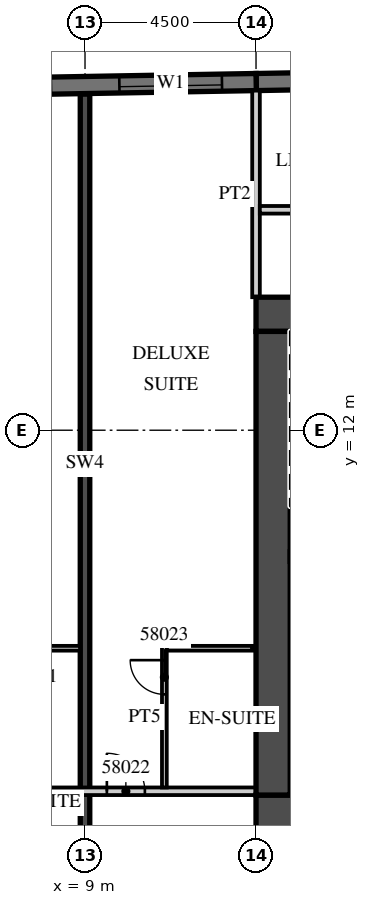
"""IFC4 building model, lengths in metres.
Left out: names, types, materials, properties, quantities, classifications, styles, units other than length and angle.
Written with IfcOpenShell. Run it as: python <this file> out.ifc"""

import sys

from ifc_helpers import new_model, si_unit, direction, frame, frame_2d, origin, place, context, subcontext, project, spatial, rectangle, extrude, element, fill, save


model = new_model("IFC4")
c1 = context("Model", 3, precision=1e-05, world=origin(), true_north=direction((0.0, 1.0)))
c2 = subcontext(c1, "Body", "Model", "MODEL_VIEW")
j1 = project(units=[si_unit("LENGTHUNIT", "METRE"), si_unit("PLANEANGLEUNIT", "RADIAN")], contexts=[c1])
p1 = place(None, origin())
s1 = spatial("IfcSite", under=j1, at=p1, CompositionType="ELEMENT")
p2 = place(p1, origin())
s2 = spatial("IfcBuilding", under=s1, at=p2, CompositionType="ELEMENT")
p3 = place(p2, frame((0.0, 0.0, 237.5)))
s3 = spatial("IfcBuildingStorey", under=s2, at=p3, CompositionType="ELEMENT", Elevation=237.5)
p4 = place(p3, frame((9.0, 1.4, 0.0), z_axis=(0.0, 0.0, 1.0), x_axis=(0.0, 1.0, 0.0)))
e1 = element("IfcWall", 1, at=p4, inside=s3, PredefinedType="SHEAR", context=c2, shape_type="SweptSolid", body=[
    extrude(rectangle(XDim=19.446, YDim=0.25, at=frame_2d((9.723, 0.0))), origin(), (0.0, 0.0, 1.0), 3.3),
])
p5 = place(p3, frame((31.504, 21.476, 0.0), z_axis=(0.0, 0.0, 1.0), x_axis=(-0.999847677887, -0.017453395744, 0.0)))
e2 = element("IfcWall", 2, at=p5, inside=s3, PredefinedType="SOLIDWALL", context=c2, shape_type="SweptSolid", body=[
    extrude(rectangle(XDim=18.003, YDim=0.45, at=frame_2d((9.001, 0.0))), origin(), (0.0, 0.0, 1.0), 3.02),
])
p6 = place(p3, frame((13.504, 21.161, 0.0), z_axis=(0.0, 0.0, 1.0), x_axis=(-0.999847763257, -0.017448504532, 0.0)))
e3 = element("IfcWall", 3, at=p6, inside=s3, PredefinedType="SOLIDWALL", context=c2, shape_type="SweptSolid", body=[
    extrude(rectangle(XDim=46.859, YDim=0.45, at=frame_2d((23.43, 0.0))), origin(), (0.0, 0.0, 1.0), 3.02),
])
p7 = place(p6, frame((0.9, 0.0, 0.45)))
e4 = element("IfcOpeningElement", 4, at=p7, cuts=e3, PredefinedType="OPENING", context=c2, shape_type="SweptSolid", body=[
    extrude(rectangle(XDim=2.7, YDim=2.25, at=frame_2d((1.35, 1.125))), frame((0.0, 0.235, 0.0), z_axis=(0.0, -1.0, 0.0), x_axis=(1.0, 0.0, 0.0)), (0.0, 0.0, 1.0), 0.47),
])
p8 = place(p6, frame((5.401, 0.0, 0.45)))
e5 = element("IfcOpeningElement", 5, at=p8, cuts=e3, PredefinedType="OPENING", context=c2, shape_type="SweptSolid", body=[
    extrude(rectangle(XDim=2.7, YDim=2.25, at=frame_2d((1.35, 1.125))), frame((0.0, 0.235, 0.0), z_axis=(0.0, -1.0, 0.0), x_axis=(1.0, 0.0, 0.0)), (0.0, 0.0, 1.0), 0.47),
])
p9 = place(p6, frame((9.902, 0.0, 0.45)))
e6 = element("IfcOpeningElement", 6, at=p9, cuts=e3, PredefinedType="OPENING", context=c2, shape_type="SweptSolid", body=[
    extrude(rectangle(XDim=2.7, YDim=2.25, at=frame_2d((1.35, 1.125))), frame((0.0, 0.235, 0.0), z_axis=(0.0, -1.0, 0.0), x_axis=(1.0, 0.0, 0.0)), (0.0, 0.0, 1.0), 0.47),
])
p10 = place(p6, frame((14.402, 0.0, 0.45)))
e7 = element("IfcOpeningElement", 7, at=p10, cuts=e3, PredefinedType="OPENING", context=c2, shape_type="SweptSolid", body=[
    extrude(rectangle(XDim=2.7, YDim=2.25, at=frame_2d((1.35, 1.125))), frame((0.0, 0.235, 0.0), z_axis=(0.0, -1.0, 0.0), x_axis=(1.0, 0.0, 0.0)), (0.0, 0.0, 1.0), 0.47),
])
p11 = place(p6, frame((18.903, 0.0, 0.45)))
e8 = element("IfcOpeningElement", 8, at=p11, cuts=e3, PredefinedType="OPENING", context=c2, shape_type="SweptSolid", body=[
    extrude(rectangle(XDim=2.7, YDim=2.25, at=frame_2d((1.35, 1.125))), frame((0.0, 0.235, 0.0), z_axis=(0.0, -1.0, 0.0), x_axis=(1.0, 0.0, 0.0)), (0.0, 0.0, 1.0), 0.47),
])
p12 = place(p6, frame((23.404, 0.0, 0.45)))
e9 = element("IfcOpeningElement", 9, at=p12, cuts=e3, PredefinedType="OPENING", context=c2, shape_type="SweptSolid", body=[
    extrude(rectangle(XDim=2.7, YDim=2.25, at=frame_2d((1.35, 1.125))), frame((0.0, 0.235, 0.0), z_axis=(0.0, -1.0, 0.0), x_axis=(1.0, 0.0, 0.0)), (0.0, 0.0, 1.0), 0.47),
])
p13 = place(p6, frame((27.904, 0.0, 0.45)))
e10 = element("IfcOpeningElement", 10, at=p13, cuts=e3, PredefinedType="OPENING", context=c2, shape_type="SweptSolid", body=[
    extrude(rectangle(XDim=2.7, YDim=2.25, at=frame_2d((1.35, 1.125))), frame((0.0, 0.235, 0.0), z_axis=(0.0, -1.0, 0.0), x_axis=(1.0, 0.0, 0.0)), (0.0, 0.0, 1.0), 0.47),
])
p14 = place(p6, frame((32.405, 0.0, 0.45)))
e11 = element("IfcOpeningElement", 11, at=p14, cuts=e3, PredefinedType="OPENING", context=c2, shape_type="SweptSolid", body=[
    extrude(rectangle(XDim=2.7, YDim=2.25, at=frame_2d((1.35, 1.125))), frame((0.0, 0.235, 0.0), z_axis=(0.0, -1.0, 0.0), x_axis=(1.0, 0.0, 0.0)), (0.0, 0.0, 1.0), 0.47),
])
p15 = place(p6, frame((36.906, 0.0, 0.45)))
e12 = element("IfcOpeningElement", 12, at=p15, cuts=e3, PredefinedType="OPENING", context=c2, shape_type="SweptSolid", body=[
    extrude(rectangle(XDim=2.7, YDim=2.25, at=frame_2d((1.35, 1.125))), frame((0.0, 0.235, 0.0), z_axis=(0.0, -1.0, 0.0), x_axis=(1.0, 0.0, 0.0)), (0.0, 0.0, 1.0), 0.47),
])
p16 = place(p6, frame((41.406, 0.0, 0.45)))
e13 = element("IfcOpeningElement", 13, at=p16, cuts=e3, PredefinedType="OPENING", context=c2, shape_type="SweptSolid", body=[
    extrude(rectangle(XDim=2.7, YDim=2.25, at=frame_2d((1.35, 1.125))), frame((0.0, 0.235, 0.0), z_axis=(0.0, -1.0, 0.0), x_axis=(1.0, 0.0, 0.0)), (0.0, 0.0, 1.0), 0.47),
])
p17 = place(p3, frame((13.5, 15.5, 0.0), z_axis=(0.0, 0.0, 1.0), x_axis=(0.0, 1.0, 0.0)))
e14 = element("IfcWall", 14, at=p17, inside=s3, PredefinedType="PARTITIONING", context=c2, shape_type="SweptSolid", body=[
    extrude(rectangle(XDim=5.436, YDim=0.2, at=frame_2d((2.718, 0.0))), origin(), (0.0, 0.0, 1.0), 3.02),
])
p18 = place(p3, frame((-13.5, 2.5, 0.0), z_axis=(0.0, 0.0, 1.0), x_axis=(1.0, 0.0, 0.0)))
e15 = element("IfcWall", 15, at=p18, inside=s3, PredefinedType="PARTITIONING", context=c2, shape_type="SweptSolid", body=[
    extrude(rectangle(XDim=27.0, YDim=0.2, at=frame_2d((13.5, 0.0))), origin(), (0.0, 0.0, 1.0), 3.02),
])
p19 = place(p18, frame((2.925, 0.0, 0.0)))
e16 = element("IfcOpeningElement", 16, at=p19, cuts=e15, PredefinedType="OPENING", context=c2, shape_type="SweptSolid", body=[
    extrude(rectangle(XDim=1.0, YDim=2.1, at=frame_2d((0.5, 1.05))), frame((0.0, 0.11, 0.0), z_axis=(0.0, -1.0, 0.0), x_axis=(1.0, 0.0, 0.0)), (0.0, 0.0, 1.0), 0.22),
])
p20 = place(p18, frame((7.45, 0.0, 0.0)))
e17 = element("IfcOpeningElement", 17, at=p20, cuts=e15, PredefinedType="OPENING", context=c2, shape_type="SweptSolid", body=[
    extrude(rectangle(XDim=1.0, YDim=2.1, at=frame_2d((0.5, 1.05))), frame((0.0, 0.11, 0.0), z_axis=(0.0, -1.0, 0.0), x_axis=(1.0, 0.0, 0.0)), (0.0, 0.0, 1.0), 0.22),
])
p21 = place(p18, frame((11.925, 0.0, 0.0)))
e18 = element("IfcOpeningElement", 18, at=p21, cuts=e15, PredefinedType="OPENING", context=c2, shape_type="SweptSolid", body=[
    extrude(rectangle(XDim=1.0, YDim=2.1, at=frame_2d((0.5, 1.05))), frame((0.0, 0.11, 0.0), z_axis=(0.0, -1.0, 0.0), x_axis=(1.0, 0.0, 0.0)), (0.0, 0.0, 1.0), 0.22),
])
p22 = place(p18, frame((16.45, 0.0, 0.0)))
e19 = element("IfcOpeningElement", 19, at=p22, cuts=e15, PredefinedType="OPENING", context=c2, shape_type="SweptSolid", body=[
    extrude(rectangle(XDim=1.0, YDim=2.1, at=frame_2d((0.5, 1.05))), frame((0.0, 0.11, 0.0), z_axis=(0.0, -1.0, 0.0), x_axis=(1.0, 0.0, 0.0)), (0.0, 0.0, 1.0), 0.22),
])
p23 = place(p18, frame((18.55, 0.0, 0.0)))
e20 = element("IfcOpeningElement", 20, at=p23, cuts=e15, PredefinedType="OPENING", context=c2, shape_type="SweptSolid", body=[
    extrude(rectangle(XDim=1.0, YDim=2.1, at=frame_2d((0.5, 1.05))), frame((0.0, 0.11, 0.0), z_axis=(0.0, -1.0, 0.0), x_axis=(1.0, 0.0, 0.0)), (0.0, 0.0, 1.0), 0.22),
])
p24 = place(p18, frame((23.075, 0.0, 0.0)))
e21 = element("IfcOpeningElement", 21, at=p24, cuts=e15, PredefinedType="OPENING", context=c2, shape_type="SweptSolid", body=[
    extrude(rectangle(XDim=1.0, YDim=2.1, at=frame_2d((0.5, 1.05))), frame((0.0, 0.11, 0.0), z_axis=(0.0, -1.0, 0.0), x_axis=(1.0, 0.0, 0.0)), (0.0, 0.0, 1.0), 0.22),
])
p25 = place(p3, frame((6.625, 6.263, 0.0), z_axis=(0.0, 0.0, 1.0), x_axis=(1.0, 0.0, 0.0)))
e22 = element("IfcWall", 22, at=p25, inside=s3, PredefinedType="PARTITIONING", context=c2, shape_type="SweptSolid", body=[
    extrude(rectangle(XDim=2.25, YDim=0.125, at=frame_2d((1.125, 0.0))), origin(), (0.0, 0.0, 1.0), 3.02),
])
p26 = place(p3, frame((11.088, 2.6, 0.0), z_axis=(0.0, 0.0, 1.0), x_axis=(0.0, 1.0, 0.0)))
e23 = element("IfcWall", 23, at=p26, inside=s3, PredefinedType="PARTITIONING", context=c2, shape_type="SweptSolid", body=[
    extrude(rectangle(XDim=3.725, YDim=0.125, at=frame_2d((1.862, 0.0))), origin(), (0.0, 0.0, 1.0), 3.02),
])
p27 = place(p26, frame((2.45, 0.0, 0.0)))
e24 = element("IfcOpeningElement", 24, at=p27, cuts=e23, PredefinedType="OPENING", context=c2, shape_type="SweptSolid", body=[
    extrude(rectangle(XDim=0.9, YDim=2.1, at=frame_2d((0.45, 1.05))), frame((0.0, 0.073, 0.0), z_axis=(0.0, -1.0, 0.0), x_axis=(1.0, 0.0, 0.0)), (0.0, 0.0, 1.0), 0.145),
])
p28 = place(p3, frame((11.15, 6.263, 0.0), z_axis=(0.0, 0.0, 1.0), x_axis=(1.0, 0.0, 0.0)))
e25 = element("IfcWall", 25, at=p28, inside=s3, PredefinedType="PARTITIONING", context=c2, shape_type="SweptSolid", body=[
    extrude(rectangle(XDim=2.25, YDim=0.125, at=frame_2d((1.125, 0.0))), origin(), (0.0, 0.0, 1.0), 3.02),
])
p29 = place(p3, frame((13.5, 1.95, 0.0), z_axis=(0.0, 0.0, 1.0), x_axis=(1.0, 0.0, 0.0)))
e26 = element("IfcWall", 26, at=p29, inside=s3, PredefinedType="SHEAR", context=c2, shape_type="SweptSolid", body=[
    extrude(rectangle(XDim=18.0, YDim=0.9, at=frame_2d((9.0, 0.0))), origin(), (0.0, 0.0, 1.0), 3.02),
])
p30 = place(p29, frame((1.475, 0.0, 0.0)))
e27 = element("IfcOpeningElement", 27, at=p30, cuts=e26, PredefinedType="OPENING", context=c2, shape_type="SweptSolid", body=[
    extrude(rectangle(XDim=1.8, YDim=2.1, at=frame_2d((0.9, 1.05))), frame((0.0, 0.46, 0.0), z_axis=(0.0, -1.0, 0.0), x_axis=(1.0, 0.0, 0.0)), (0.0, 0.0, 1.0), 0.92),
])
p31 = place(p3, frame((13.5, 15.05, 0.0), z_axis=(0.0, 0.0, 1.0), x_axis=(1.0, 0.0, 0.0)))
e28 = element("IfcWall", 28, at=p31, inside=s3, PredefinedType="SHEAR", context=c2, shape_type="SweptSolid", body=[
    extrude(rectangle(XDim=6.8, YDim=0.9, at=frame_2d((3.4, 0.0))), origin(), (0.0, 0.0, 1.0), 3.02),
])
p32 = place(p31, frame((4.725, 0.0, 0.0)))
e29 = element("IfcOpeningElement", 29, at=p32, cuts=e28, PredefinedType="OPENING", context=c2, shape_type="SweptSolid", body=[
    extrude(rectangle(XDim=1.2, YDim=2.1, at=frame_2d((0.6, 1.05))), frame((0.0, 0.46, 0.0), z_axis=(0.0, -1.0, 0.0), x_axis=(1.0, 0.0, 0.0)), (0.0, 0.0, 1.0), 0.92),
])
p33 = place(p3, frame((13.95, 2.4, 0.0), z_axis=(0.0, 0.0, 1.0), x_axis=(0.0, 1.0, 0.0)))
e30 = element("IfcWall", 30, at=p33, inside=s3, PredefinedType="SHEAR", context=c2, shape_type="SweptSolid", body=[
    extrude(rectangle(XDim=12.2, YDim=0.9, at=frame_2d((6.1, 0.0))), origin(), (0.0, 0.0, 1.0), 3.02),
])
p34 = place(p3, frame((13.6, 17.8, 0.0), z_axis=(0.0, 0.0, 1.0), x_axis=(1.0, 0.0, 0.0)))
e31 = element("IfcWall", 31, at=p34, inside=s3, PredefinedType="PARTITIONING", context=c2, shape_type="SweptSolid", body=[
    extrude(rectangle(XDim=28.657, YDim=0.2, at=frame_2d((14.329, 0.0))), origin(), (0.0, 0.0, 1.0), 3.02),
])
p35 = place(p34, frame((16.613, 0.0, 0.0)))
e32 = element("IfcOpeningElement", 32, at=p35, cuts=e31, PredefinedType="OPENING", context=c2, shape_type="SweptSolid", body=[
    extrude(rectangle(XDim=0.9, YDim=2.1, at=frame_2d((0.45, 1.05))), frame((0.0, 0.11, 0.0), z_axis=(0.0, -1.0, 0.0), x_axis=(1.0, 0.0, 0.0)), (0.0, 0.0, 1.0), 0.22),
])
p36 = place(p34, frame((8.312, 0.0, 0.0)))
e33 = element("IfcOpeningElement", 33, at=p36, cuts=e31, PredefinedType="OPENING", context=c2, shape_type="SweptSolid", body=[
    extrude(rectangle(XDim=0.9, YDim=2.1, at=frame_2d((0.45, 1.05))), frame((0.0, 0.11, 0.0), z_axis=(0.0, -1.0, 0.0), x_axis=(1.0, 0.0, 0.0)), (0.0, 0.0, 1.0), 0.22),
])
p37 = place(p7, origin())
e34 = element("IfcWindow", 34, at=p37, inside=s3, PartitioningType="SINGLE_PANEL", PredefinedType="WINDOW", context=c2, shape_type="SweptSolid", body=[
    extrude(rectangle(XDim=2.7, YDim=2.25, at=frame_2d((1.35, 1.125))), frame((0.0, 0.09, 0.0), z_axis=(0.0, -1.0, 0.0), x_axis=(1.0, 0.0, 0.0)), (0.0, 0.0, 1.0), 0.06),
])
fill(e4, e34)
p38 = place(p24, origin())
e35 = element("IfcDoor", 35, at=p38, inside=s3, OperationType="SINGLE_SWING_LEFT", PredefinedType="DOOR", context=c2, shape_type="SweptSolid", body=[
    extrude(rectangle(XDim=1.0, YDim=2.1, at=frame_2d((0.5, 1.05))), frame((0.0, 0.025, 0.0), z_axis=(0.0, -1.0, 0.0), x_axis=(1.0, 0.0, 0.0)), (0.0, 0.0, 1.0), 0.05),
])
fill(e21, e35)
p39 = place(p27, origin())
e36 = element("IfcDoor", 36, at=p39, inside=s3, OperationType="SINGLE_SWING_RIGHT", PredefinedType="DOOR", context=c2, shape_type="SweptSolid", body=[
    extrude(rectangle(XDim=0.9, YDim=2.1, at=frame_2d((0.45, 1.05))), frame((0.0, 0.025, 0.0), z_axis=(0.0, -1.0, 0.0), x_axis=(1.0, 0.0, 0.0)), (0.0, 0.0, 1.0), 0.05),
])
fill(e24, e36)
save(model, sys.argv[1])
